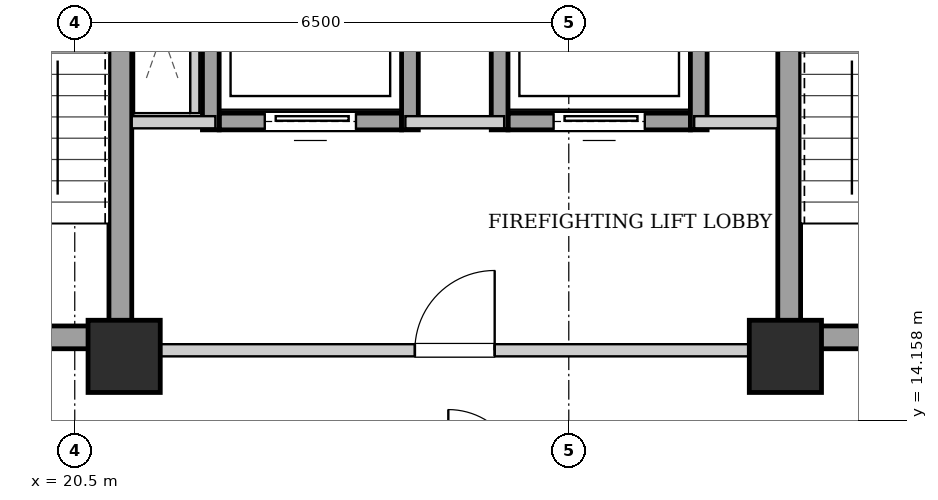
"""IFC4 building model, lengths in metres.
Left out: names, types, materials, properties, quantities, classifications, styles, units other than length and angle.
Written with IfcOpenShell. Run it as: python <this file> out.ifc"""

import sys

from ifc_helpers import new_model, si_unit, direction, frame, frame_2d, origin, origin_2d, place, context, subcontext, project, spatial, rectangle, extrude, element, fill, save


model = new_model("IFC4")
c1 = context("Model", 3, precision=1e-05, world=origin(), true_north=direction((0.0, 1.0)))
c2 = subcontext(c1, "Body", "Model", "MODEL_VIEW")
j1 = project(units=[si_unit("LENGTHUNIT", "METRE"), si_unit("PLANEANGLEUNIT", "RADIAN")], contexts=[c1])
p1 = place(None, origin())
s1 = spatial("IfcSite", under=j1, at=p1, CompositionType="ELEMENT")
p2 = place(p1, origin())
s2 = spatial("IfcBuilding", under=s1, at=p2, CompositionType="ELEMENT")
p3 = place(p2, frame((0.0, 0.0, 156.9)))
s3 = spatial("IfcBuildingStorey", under=s2, at=p3, CompositionType="ELEMENT", Elevation=156.9)
for number, where, z_axis, x_axis in (
    (1, (21.15, 15.0, 0.0), (0.0, 0.0, 1.0), (1.0, 0.0, 0.0)),
    (2, (29.85, 15.0, 0.0), (0.0, 0.0, 1.0), (1.0, 0.0, 0.0)),
):
    element("IfcColumn", number, at=place(p3, frame(where, z_axis=z_axis, x_axis=x_axis)), inside=s3, PredefinedType="COLUMN", context=c2, shape_type="SweptSolid", body=[
        extrude(rectangle(XDim=0.95, YDim=0.95, at=origin_2d()), origin(), (0.0, 0.0, 1.0), 3.25),
    ])
p4 = place(p3, frame((21.1, 15.1, 0.0), z_axis=(0.0, 0.0, 1.0), x_axis=(0.0, 1.0, 0.0)))
e3 = element("IfcWall", 3, at=p4, inside=s3, PredefinedType="SHEAR", context=c2, shape_type="SweptSolid", body=[
    extrude(rectangle(XDim=9.0, YDim=0.3, at=frame_2d((4.5, 0.0))), origin(), (0.0, 0.0, 1.0), 2.99),
])
p5 = place(p3, frame((18.1, 15.25, 0.0), z_axis=(0.0, 0.0, 1.0), x_axis=(1.0, 0.0, 0.0)))
e4 = element("IfcWall", 4, at=p5, inside=s3, PredefinedType="SHEAR", context=c2, shape_type="SweptSolid", body=[
    extrude(rectangle(XDim=2.85, YDim=0.3, at=frame_2d((1.425, 0.0))), origin(), (0.0, 0.0, 1.0), 2.99),
])
p6 = place(p5, frame((0.86, 0.0, 0.0)))
e5 = element("IfcOpeningElement", 5, at=p6, cuts=e4, PredefinedType="OPENING", context=c2, shape_type="SweptSolid", body=[
    extrude(rectangle(XDim=1.1, YDim=2.05, at=frame_2d((0.55, 1.025))), frame((0.0, 0.16, 0.0), z_axis=(0.0, -1.0, 0.0), x_axis=(1.0, 0.0, 0.0)), (0.0, 0.0, 1.0), 0.32),
])
p7 = place(p3, frame((29.9, 15.1, 0.0), z_axis=(0.0, 0.0, 1.0), x_axis=(0.0, 1.0, 0.0)))
e6 = element("IfcWall", 6, at=p7, inside=s3, PredefinedType="SHEAR", context=c2, shape_type="SweptSolid", body=[
    extrude(rectangle(XDim=9.0, YDim=0.3, at=frame_2d((4.5, 0.0))), origin(), (0.0, 0.0, 1.0), 2.99),
])
p8 = place(p3, frame((30.05, 15.25, 0.0), z_axis=(0.0, 0.0, 1.0), x_axis=(1.0, 0.0, 0.0)))
e7 = element("IfcWall", 7, at=p8, inside=s3, PredefinedType="SHEAR", context=c2, shape_type="SweptSolid", body=[
    extrude(rectangle(XDim=2.85, YDim=0.3, at=frame_2d((1.425, 0.0))), origin(), (0.0, 0.0, 1.0), 2.99),
])
p9 = place(p8, frame((0.86, 0.0, 0.0)))
e8 = element("IfcOpeningElement", 8, at=p9, cuts=e7, PredefinedType="OPENING", context=c2, shape_type="SweptSolid", body=[
    extrude(rectangle(XDim=1.1, YDim=2.05, at=frame_2d((0.55, 1.025))), frame((0.0, 0.16, 0.0), z_axis=(0.0, -1.0, 0.0), x_axis=(1.0, 0.0, 0.0)), (0.0, 0.0, 1.0), 0.32),
])
p10 = place(p3, frame((22.4, 18.09, 0.0), z_axis=(0.0, 0.0, 1.0), x_axis=(1.0, 0.0, 0.0)))
e9 = element("IfcWall", 9, at=p10, inside=s3, PredefinedType="SHEAR", context=c2, shape_type="SweptSolid", body=[
    extrude(rectangle(XDim=2.4, YDim=0.22, at=frame_2d((1.2, 0.0))), origin(), (0.0, 0.0, 1.0), 2.99),
])
p11 = place(p10, frame((0.6, 0.0, 0.0)))
e10 = element("IfcOpeningElement", 10, at=p11, cuts=e9, PredefinedType="OPENING", context=c2, shape_type="SweptSolid", body=[
    extrude(rectangle(XDim=1.2, YDim=2.15, at=frame_2d((0.6, 1.075))), frame((0.0, 0.12, 0.0), z_axis=(0.0, -1.0, 0.0), x_axis=(1.0, 0.0, 0.0)), (0.0, 0.0, 1.0), 0.24),
])
for number, where, z_axis, x_axis in (
    (11, (22.29, 17.98, 0.0), (0.0, 0.0, 1.0), (0.0, 1.0, 0.0)),
    (12, (24.91, 17.98, 0.0), (0.0, 0.0, 1.0), (0.0, 1.0, 0.0)),
):
    element("IfcWall", number, at=place(p3, frame(where, z_axis=z_axis, x_axis=x_axis)), inside=s3, PredefinedType="SHEAR", context=c2, shape_type="SweptSolid", body=[
        extrude(rectangle(XDim=2.54, YDim=0.22, at=frame_2d((1.27, 0.0))), origin(), (0.0, 0.0, 1.0), 2.99),
    ])
p12 = place(p3, frame((26.2, 18.09, 0.0), z_axis=(0.0, 0.0, 1.0), x_axis=(1.0, 0.0, 0.0)))
e13 = element("IfcWall", 13, at=p12, inside=s3, PredefinedType="SHEAR", context=c2, shape_type="SweptSolid", body=[
    extrude(rectangle(XDim=2.4, YDim=0.22, at=frame_2d((1.2, 0.0))), origin(), (0.0, 0.0, 1.0), 2.99),
])
p13 = place(p12, frame((0.6, 0.0, 0.0)))
e14 = element("IfcOpeningElement", 14, at=p13, cuts=e13, PredefinedType="OPENING", context=c2, shape_type="SweptSolid", body=[
    extrude(rectangle(XDim=1.2, YDim=2.15, at=frame_2d((0.6, 1.075))), frame((0.0, 0.12, 0.0), z_axis=(0.0, -1.0, 0.0), x_axis=(1.0, 0.0, 0.0)), (0.0, 0.0, 1.0), 0.24),
])
for number, where, z_axis, x_axis in (
    (15, (26.09, 17.98, 0.0), (0.0, 0.0, 1.0), (0.0, 1.0, 0.0)),
    (16, (28.71, 17.98, 0.0), (0.0, 0.0, 1.0), (0.0, 1.0, 0.0)),
):
    element("IfcWall", number, at=place(p3, frame(where, z_axis=z_axis, x_axis=x_axis)), inside=s3, PredefinedType="SHEAR", context=c2, shape_type="SweptSolid", body=[
        extrude(rectangle(XDim=2.54, YDim=0.22, at=frame_2d((1.27, 0.0))), origin(), (0.0, 0.0, 1.0), 2.99),
    ])
p14 = place(p3, frame((21.25, 15.08, 0.0), z_axis=(0.0, 0.0, 1.0), x_axis=(1.0, 0.0, 0.0)))
e17 = element("IfcWall", 17, at=p14, inside=s3, PredefinedType="PARTITIONING", context=c2, shape_type="SweptSolid", body=[
    extrude(rectangle(XDim=8.5, YDim=0.16, at=frame_2d((4.25, 0.0))), origin(), (0.0, 0.0, 1.0), 2.442),
])
p15 = place(p14, frame((3.725, 0.0, 0.0)))
e18 = element("IfcOpeningElement", 18, at=p15, cuts=e17, PredefinedType="OPENING", context=c2, shape_type="SweptSolid", body=[
    extrude(rectangle(XDim=1.05, YDim=2.05, at=frame_2d((0.525, 1.025))), frame((0.0, 0.09, 0.0), z_axis=(0.0, -1.0, 0.0), x_axis=(1.0, 0.0, 0.0)), (0.0, 0.0, 1.0), 0.18),
])
p16 = place(p3, frame((21.25, 18.08, 0.0), z_axis=(0.0, 0.0, 1.0), x_axis=(1.0, 0.0, 0.0)))
e19 = element("IfcWall", 19, at=p16, inside=s3, PredefinedType="PARTITIONING", context=c2, shape_type="SweptSolid", body=[
    extrude(rectangle(XDim=1.1, YDim=0.16, at=frame_2d((0.55, 0.0))), origin(), (0.0, 0.0, 1.0), 2.99),
])
p17 = place(p3, frame((24.85, 18.08, 0.0), z_axis=(0.0, 0.0, 1.0), x_axis=(1.0, 0.0, 0.0)))
e20 = element("IfcWall", 20, at=p17, inside=s3, PredefinedType="PARTITIONING", context=c2, shape_type="SweptSolid", body=[
    extrude(rectangle(XDim=1.3, YDim=0.16, at=frame_2d((0.65, 0.0))), origin(), (0.0, 0.0, 1.0), 2.99),
])
p18 = place(p3, frame((28.65, 18.08, 0.0), z_axis=(0.0, 0.0, 1.0), x_axis=(1.0, 0.0, 0.0)))
e21 = element("IfcWall", 21, at=p18, inside=s3, PredefinedType="PARTITIONING", context=c2, shape_type="SweptSolid", body=[
    extrude(rectangle(XDim=1.1, YDim=0.16, at=frame_2d((0.55, 0.0))), origin(), (0.0, 0.0, 1.0), 2.99),
])
p19 = place(p3, frame((22.08, 18.2, 0.0), z_axis=(0.0, 0.0, 1.0), x_axis=(0.0, 1.0, 0.0)))
e22 = element("IfcWall", 22, at=p19, inside=s3, PredefinedType="PARTITIONING", context=c2, shape_type="SweptSolid", body=[
    extrude(rectangle(XDim=2.12, YDim=0.12, at=frame_2d((1.06, 0.0))), origin(), (0.0, 0.0, 1.0), 2.99),
])
p20 = place(p11, origin())
e23 = element("IfcDoor", 23, at=p20, inside=s3, OperationType="SLIDING_TO_LEFT", PredefinedType="DOOR", context=c2, shape_type="SweptSolid", body=[
    extrude(rectangle(XDim=1.2, YDim=2.15, at=frame_2d((0.6, 1.075))), frame((0.0, 0.025, 0.0), z_axis=(0.0, -1.0, 0.0), x_axis=(1.0, 0.0, 0.0)), (0.0, 0.0, 1.0), 0.05),
])
fill(e10, e23)
p21 = place(p13, origin())
e24 = element("IfcDoor", 24, at=p21, inside=s3, OperationType="SLIDING_TO_LEFT", PredefinedType="DOOR", context=c2, shape_type="SweptSolid", body=[
    extrude(rectangle(XDim=1.2, YDim=2.15, at=frame_2d((0.6, 1.075))), frame((0.0, 0.025, 0.0), z_axis=(0.0, -1.0, 0.0), x_axis=(1.0, 0.0, 0.0)), (0.0, 0.0, 1.0), 0.05),
])
fill(e14, e24)
p22 = place(p15, origin())
e25 = element("IfcDoor", 25, at=p22, inside=s3, OperationType="SINGLE_SWING_RIGHT", PredefinedType="DOOR", context=c2, shape_type="SweptSolid", body=[
    extrude(rectangle(XDim=1.05, YDim=2.05, at=frame_2d((0.525, 1.025))), frame((0.0, 0.025, 0.0), z_axis=(0.0, -1.0, 0.0), x_axis=(1.0, 0.0, 0.0)), (0.0, 0.0, 1.0), 0.05),
])
fill(e18, e25)
save(model, sys.argv[1])
